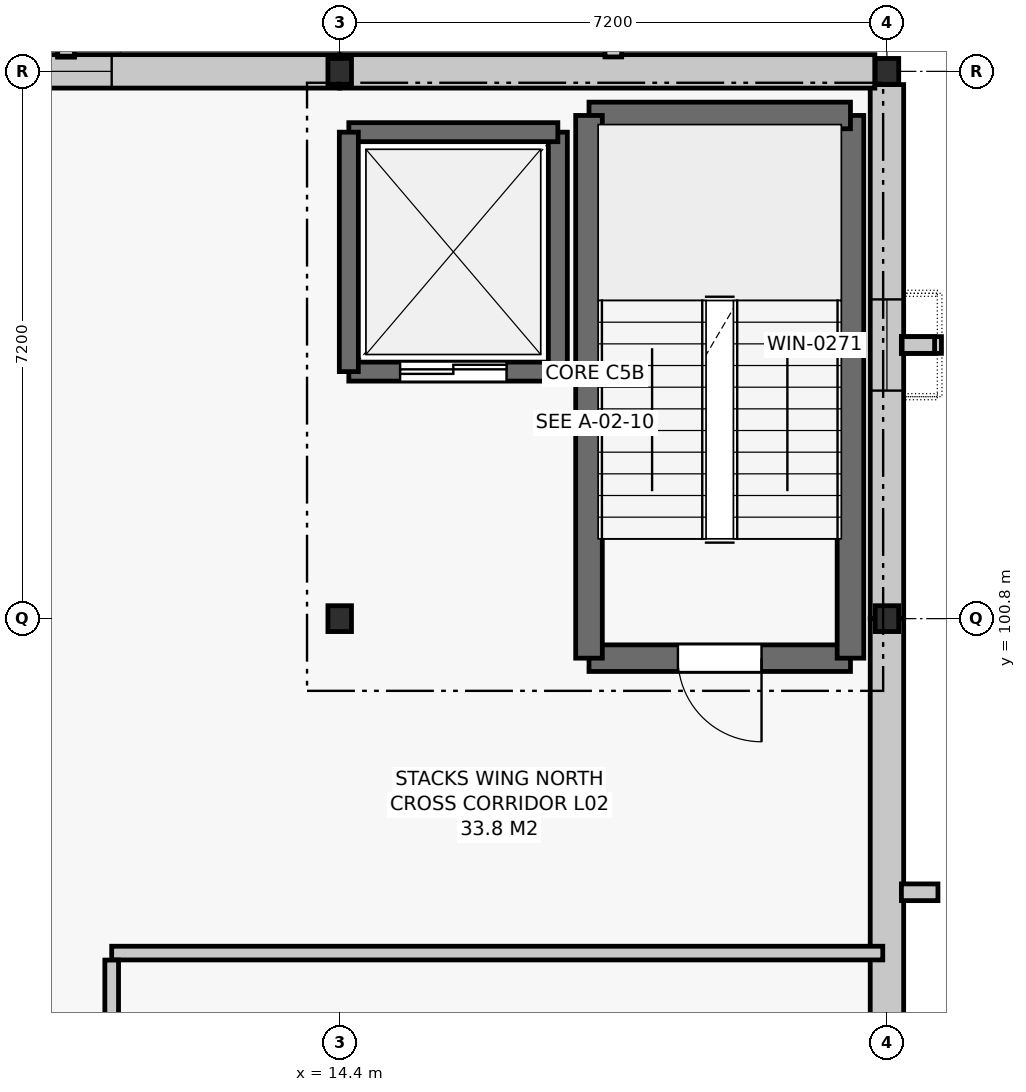
"""IFC4 building model, lengths in metres.
Left out: names, types, materials, properties, quantities, classifications, styles, units other than length and angle.
Written with IfcOpenShell. Run it as: python <this file> out.ifc"""

import sys

from ifc_helpers import new_model, si_unit, direction, frame, frame_2d, origin, origin_2d, place, context, subcontext, project, spatial, rectangle, i_section, extrude, element, fill, save


model = new_model("IFC4")
c1 = context("Model", 3, precision=1e-05, world=origin(), true_north=direction((0.0, 1.0)))
c2 = subcontext(c1, "Body", "Model", "MODEL_VIEW")
j1 = project(units=[si_unit("LENGTHUNIT", "METRE"), si_unit("PLANEANGLEUNIT", "RADIAN")], contexts=[c1])
p1 = place(None, origin())
s1 = spatial("IfcSite", under=j1, at=p1, CompositionType="ELEMENT")
p2 = place(p1, origin())
s2 = spatial("IfcBuilding", under=s1, at=p2, CompositionType="ELEMENT")
p3 = place(p2, frame((0.0, 0.0, 10.2)))
s3 = spatial("IfcBuildingStorey", under=s2, at=p3, CompositionType="ELEMENT", Elevation=10.2)
for number, where, z_axis, x_axis in (
    (1, (14.4, 100.8, 0.0), (0.0, 0.0, 1.0), (1.0, 0.0, 0.0)),
    (2, (14.4, 108.0, 0.0), (0.0, 0.0, 1.0), (1.0, 0.0, 0.0)),
    (3, (21.6, 100.8, 0.0), (0.0, 0.0, 1.0), (1.0, 0.0, 0.0)),
    (4, (21.6, 108.0, 0.0), (0.0, 0.0, 1.0), (1.0, 0.0, 0.0)),
):
    element("IfcColumn", number, at=place(p3, frame(where, z_axis=z_axis, x_axis=x_axis)), inside=s3, PredefinedType="COLUMN", context=c2, shape_type="SweptSolid", body=[
        extrude(i_section(OverallWidth=0.31, OverallDepth=0.34, WebThickness=0.021, FlangeThickness=0.035, FilletRadius=0.027, at=origin_2d()), origin(), (0.0, 0.0, 1.0), 4.2),
    ])
p4 = place(p3, frame((21.6, 93.6, 0.0), z_axis=(0.0, 0.0, 1.0), x_axis=(0.0, 1.0, 0.0)))
e5 = element("IfcWall", 5, at=p4, inside=s3, PredefinedType="SOLIDWALL", context=c2, shape_type="SweptSolid", body=[
    extrude(rectangle(XDim=7.2, YDim=0.44, at=frame_2d((3.6, 0.0))), origin(), (0.0, 0.0, 1.0), 3.18),
])
p5 = place(p3, frame((21.6, 100.8, 0.0), z_axis=(0.0, 0.0, 1.0), x_axis=(0.0, 1.0, 0.0)))
e6 = element("IfcWall", 6, at=p5, inside=s3, PredefinedType="SOLIDWALL", context=c2, shape_type="SweptSolid", body=[
    extrude(rectangle(XDim=7.026, YDim=0.44, at=frame_2d((3.513, 0.0))), origin(), (0.0, 0.0, 1.0), 3.18),
])
p6 = place(p5, frame((3.0, 0.0, 0.95)))
e7 = element("IfcOpeningElement", 7, at=p6, cuts=e6, PredefinedType="OPENING", context=c2, shape_type="SweptSolid", body=[
    extrude(rectangle(XDim=1.2, YDim=2.15, at=frame_2d((0.6, 1.075))), frame((0.0, 0.232, 0.0), z_axis=(0.0, -1.0, 0.0), x_axis=(1.0, 0.0, 0.0)), (0.0, 0.0, 1.0), 0.464),
])
p7 = place(p3, frame((21.441, 108.0, 0.0), z_axis=(0.0, 0.0, 1.0), x_axis=(-1.0, 0.0, 0.0)))
e8 = element("IfcWall", 8, at=p7, inside=s3, PredefinedType="SOLIDWALL", context=c2, shape_type="SweptSolid", body=[
    extrude(rectangle(XDim=7.041, YDim=0.44, at=frame_2d((3.521, 0.0))), origin(), (0.0, 0.0, 1.0), 3.18),
])
p8 = place(p3, frame((14.4, 108.0, 0.0), z_axis=(0.0, 0.0, 1.0), x_axis=(-1.0, 0.0, 0.0)))
e9 = element("IfcWall", 9, at=p8, inside=s3, PredefinedType="SOLIDWALL", context=c2, shape_type="SweptSolid", body=[
    extrude(rectangle(XDim=7.2, YDim=0.44, at=frame_2d((3.6, 0.0))), origin(), (0.0, 0.0, 1.0), 3.18),
])
p9 = place(p8, frame((3.0, 0.0, 0.95)))
e10 = element("IfcOpeningElement", 10, at=p9, cuts=e9, PredefinedType="OPENING", context=c2, shape_type="SweptSolid", body=[
    extrude(rectangle(XDim=1.2, YDim=2.15, at=frame_2d((0.6, 1.075))), frame((0.0, 0.232, 0.0), z_axis=(0.0, -1.0, 0.0), x_axis=(1.0, 0.0, 0.0)), (0.0, 0.0, 1.0), 0.464),
])
p10 = place(p3, frame((17.68, 100.28, 0.0), z_axis=(0.0, 0.0, 1.0), x_axis=(1.0, 0.0, 0.0)))
e11 = element("IfcWall", 11, at=p10, inside=s3, PredefinedType="SHEAR", context=c2, shape_type="SweptSolid", body=[
    extrude(rectangle(XDim=3.44, YDim=0.35, at=frame_2d((1.72, 0.0))), origin(), (0.0, 0.0, 1.0), 3.9),
])
p11 = place(p10, frame((1.17, 0.0, 0.0)))
e12 = element("IfcOpeningElement", 12, at=p11, cuts=e11, PredefinedType="OPENING", context=c2, shape_type="SweptSolid", body=[
    extrude(rectangle(XDim=1.1, YDim=2.15, at=frame_2d((0.55, 1.075))), frame((0.0, 0.187, 0.0), z_axis=(0.0, -1.0, 0.0), x_axis=(1.0, 0.0, 0.0)), (0.0, 0.0, 1.0), 0.374),
])
p12 = place(p3, frame((21.12, 100.28, 0.0), z_axis=(0.0, 0.0, 1.0), x_axis=(0.0, 1.0, 0.0)))
e13 = element("IfcWall", 13, at=p12, inside=s3, PredefinedType="SHEAR", context=c2, shape_type="SweptSolid", body=[
    extrude(rectangle(XDim=7.14, YDim=0.35, at=frame_2d((3.57, 0.0))), origin(), (0.0, 0.0, 1.0), 3.9),
])
p13 = place(p3, frame((21.12, 107.42, 0.0), z_axis=(0.0, 0.0, 1.0), x_axis=(-1.0, 0.0, 0.0)))
e14 = element("IfcWall", 14, at=p13, inside=s3, PredefinedType="SHEAR", context=c2, shape_type="SweptSolid", body=[
    extrude(rectangle(XDim=3.44, YDim=0.35, at=frame_2d((1.72, 0.0))), origin(), (0.0, 0.0, 1.0), 3.9),
])
p14 = place(p3, frame((17.68, 107.42, 0.0), z_axis=(0.0, 0.0, 1.0), x_axis=(0.0, -1.0, 0.0)))
e15 = element("IfcWall", 15, at=p14, inside=s3, PredefinedType="SHEAR", context=c2, shape_type="SweptSolid", body=[
    extrude(rectangle(XDim=7.14, YDim=0.35, at=frame_2d((3.57, 0.0))), origin(), (0.0, 0.0, 1.0), 3.9),
])
p15 = place(p3, frame((14.52, 104.05, 0.0), z_axis=(0.0, 0.0, 1.0), x_axis=(1.0, 0.0, 0.0)))
e16 = element("IfcWall", 16, at=p15, inside=s3, PredefinedType="SHEAR", context=c2, shape_type="SweptSolid", body=[
    extrude(rectangle(XDim=2.75, YDim=0.25, at=frame_2d((1.375, 0.0))), origin(), (0.0, 0.0, 1.0), 3.9),
])
p16 = place(p15, frame((0.675, 0.0, 0.0)))
e17 = element("IfcOpeningElement", 17, at=p16, cuts=e16, PredefinedType="OPENING", context=c2, shape_type="SweptSolid", body=[
    extrude(rectangle(XDim=1.4, YDim=2.2, at=frame_2d((0.7, 1.1))), frame((0.0, 0.137, 0.0), z_axis=(0.0, -1.0, 0.0), x_axis=(1.0, 0.0, 0.0)), (0.0, 0.0, 1.0), 0.274),
])
p17 = place(p3, frame((17.27, 104.05, 0.0), z_axis=(0.0, 0.0, 1.0), x_axis=(0.0, 1.0, 0.0)))
e18 = element("IfcWall", 18, at=p17, inside=s3, PredefinedType="SHEAR", context=c2, shape_type="SweptSolid", body=[
    extrude(rectangle(XDim=3.15, YDim=0.25, at=frame_2d((1.575, 0.0))), origin(), (0.0, 0.0, 1.0), 3.9),
])
p18 = place(p3, frame((17.27, 107.2, 0.0), z_axis=(0.0, 0.0, 1.0), x_axis=(-1.0, 0.0, 0.0)))
e19 = element("IfcWall", 19, at=p18, inside=s3, PredefinedType="SHEAR", context=c2, shape_type="SweptSolid", body=[
    extrude(rectangle(XDim=2.75, YDim=0.25, at=frame_2d((1.375, 0.0))), origin(), (0.0, 0.0, 1.0), 3.9),
])
p19 = place(p3, frame((14.52, 107.2, 0.0), z_axis=(0.0, 0.0, 1.0), x_axis=(0.0, -1.0, 0.0)))
e20 = element("IfcWall", 20, at=p19, inside=s3, PredefinedType="SHEAR", context=c2, shape_type="SweptSolid", body=[
    extrude(rectangle(XDim=3.15, YDim=0.25, at=frame_2d((1.575, 0.0))), origin(), (0.0, 0.0, 1.0), 3.9),
])
p20 = place(p3, frame((11.4, 96.4, 0.0), z_axis=(0.0, 0.0, 1.0), x_axis=(1.0, 0.0, 0.0)))
e21 = element("IfcWall", 21, at=p20, inside=s3, PredefinedType="PARTITIONING", context=c2, shape_type="SweptSolid", body=[
    extrude(rectangle(XDim=10.145, YDim=0.18, at=frame_2d((5.073, 0.0))), origin(), (0.0, 0.0, 1.0), 3.285),
])
p21 = place(p3, frame((11.4, 72.092, 0.0), z_axis=(0.0, 0.0, 1.0), x_axis=(0.0, 1.0, 0.0)))
e22 = element("IfcWall", 22, at=p21, inside=s3, PredefinedType="PARTITIONING", context=c2, shape_type="SweptSolid", body=[
    extrude(rectangle(XDim=24.216, YDim=0.18, at=frame_2d((12.108, 0.0))), origin(), (0.0, 0.0, 1.0), 3.285),
])
p22 = place(p21, frame((11.283, 0.0, 0.0)))
e23 = element("IfcOpeningElement", 23, at=p22, cuts=e22, PredefinedType="OPENING", context=c2, shape_type="SweptSolid", body=[
    extrude(rectangle(XDim=1.65, YDim=2.25, at=frame_2d((0.825, 1.125))), frame((0.0, 0.102, 0.0), z_axis=(0.0, -1.0, 0.0), x_axis=(1.0, 0.0, 0.0)), (0.0, 0.0, 1.0), 0.204),
])
p23 = place(p6, origin())
e24 = element("IfcWindow", 24, at=p23, inside=s3, PartitioningType="SINGLE_PANEL", PredefinedType="WINDOW", context=c2, shape_type="SweptSolid", body=[
    extrude(rectangle(XDim=1.2, YDim=2.15, at=frame_2d((0.6, 1.075))), frame((0.0, 0.03, 0.0), z_axis=(0.0, -1.0, 0.0), x_axis=(1.0, 0.0, 0.0)), (0.0, 0.0, 1.0), 0.06),
])
fill(e7, e24)
p24 = place(p9, origin())
e25 = element("IfcWindow", 25, at=p24, inside=s3, PartitioningType="SINGLE_PANEL", PredefinedType="WINDOW", context=c2, shape_type="SweptSolid", body=[
    extrude(rectangle(XDim=1.2, YDim=2.15, at=frame_2d((0.6, 1.075))), frame((0.0, 0.03, 0.0), z_axis=(0.0, -1.0, 0.0), x_axis=(1.0, 0.0, 0.0)), (0.0, 0.0, 1.0), 0.06),
])
fill(e10, e25)
p25 = place(p11, frame((1.1, 0.0, 0.0), z_axis=(0.0, 0.0, 1.0), x_axis=(-1.0, 0.0, 0.0)))
e26 = element("IfcDoor", 26, at=p25, inside=s3, OperationType="SINGLE_SWING_LEFT", PredefinedType="DOOR", context=c2, shape_type="SweptSolid", body=[
    extrude(rectangle(XDim=1.1, YDim=2.15, at=frame_2d((0.55, 1.075))), frame((0.0, 0.025, 0.0), z_axis=(0.0, -1.0, 0.0), x_axis=(1.0, 0.0, 0.0)), (0.0, 0.0, 1.0), 0.05),
])
fill(e12, e26)
p26 = place(p16, origin())
e27 = element("IfcDoor", 27, at=p26, inside=s3, OperationType="DOUBLE_DOOR_SLIDING", PredefinedType="DOOR", context=c2, shape_type="SweptSolid", body=[
    extrude(rectangle(XDim=1.4, YDim=2.2, at=frame_2d((0.7, 1.1))), frame((0.0, 0.025, 0.0), z_axis=(0.0, -1.0, 0.0), x_axis=(1.0, 0.0, 0.0)), (0.0, 0.0, 1.0), 0.05),
])
fill(e17, e27)
save(model, sys.argv[1])
